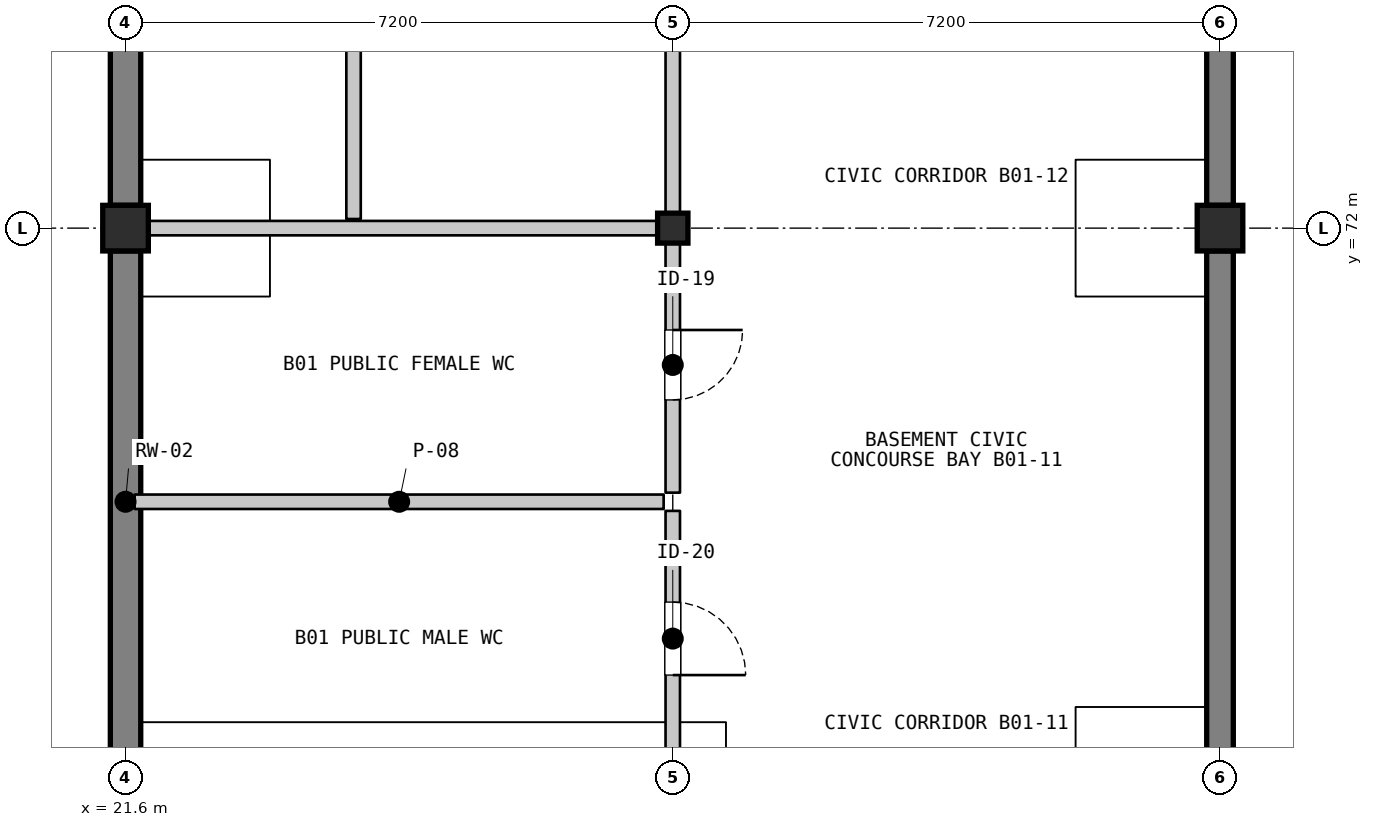
"""IFC4 building model, lengths in metres.
Left out: names, types, materials, properties, quantities, classifications, styles, units other than length and angle.
Written with IfcOpenShell. Run it as: python <this file> out.ifc"""

import sys

from ifc_helpers import new_model, si_unit, direction, frame, frame_2d, origin, origin_2d, place, context, subcontext, project, spatial, rectangle, i_section, extrude, element, fill, save


model = new_model("IFC4")
c1 = context("Model", 3, precision=1e-05, world=origin(), true_north=direction((0.0, 1.0)))
c2 = subcontext(c1, "Body", "Model", "MODEL_VIEW")
j1 = project(units=[si_unit("LENGTHUNIT", "METRE"), si_unit("PLANEANGLEUNIT", "RADIAN")], contexts=[c1])
p1 = place(None, origin())
s1 = spatial("IfcSite", under=j1, at=p1, CompositionType="ELEMENT")
p2 = place(p1, origin())
s2 = spatial("IfcBuilding", under=s1, at=p2, CompositionType="ELEMENT")
p3 = place(p2, frame((0.0, 0.0, -4.2)))
s3 = spatial("IfcBuildingStorey", under=s2, at=p3, CompositionType="ELEMENT", Elevation=-4.2)
for number, where, z_axis, x_axis in (
    (1, (21.6, 65.1, 0.0), (0.0, 0.0, 1.0), (0.0, 1.0, 0.0)),
    (2, (21.6, 72.3, 0.0), (0.0, 0.0, 1.0), (0.0, 1.0, 0.0)),
):
    element("IfcWall", number, at=place(p3, frame(where, z_axis=z_axis, x_axis=x_axis)), inside=s3, PredefinedType="USERDEFINED", context=c2, shape_type="SweptSolid", body=[
        extrude(rectangle(XDim=6.6, YDim=0.4, at=frame_2d((3.3, 0.0))), origin(), (0.0, 0.0, 1.0), 3.98),
    ])
for number, where, z_axis, x_axis in (
    (3, (36.0, 65.1, 0.0), (0.0, 0.0, 1.0), (0.0, 1.0, 0.0)),
    (4, (36.0, 72.3, 0.0), (0.0, 0.0, 1.0), (0.0, 1.0, 0.0)),
):
    element("IfcWall", number, at=place(p3, frame(where, z_axis=z_axis, x_axis=x_axis)), inside=s3, PredefinedType="USERDEFINED", context=c2, shape_type="SweptSolid", body=[
        extrude(rectangle(XDim=6.6, YDim=0.35, at=frame_2d((3.3, 0.0))), origin(), (0.0, 0.0, 1.0), 3.98),
    ])
p4 = place(p3, frame((21.6, 72.0, 0.0), z_axis=(0.0, 0.0, 1.0), x_axis=(1.0, 0.0, 0.0)))
e5 = element("IfcColumn", 5, at=p4, inside=s3, PredefinedType="COLUMN", context=c2, shape_type="SweptSolid", body=[
    extrude(rectangle(XDim=0.6, YDim=0.6, at=origin_2d()), origin(), (0.0, 0.0, 1.0), 4.2),
])
p5 = place(p3, frame((28.8, 72.0, 0.0), z_axis=(0.0, 0.0, 1.0), x_axis=(1.0, 0.0, 0.0)))
e6 = element("IfcColumn", 6, at=p5, inside=s3, PredefinedType="COLUMN", context=c2, shape_type="SweptSolid", body=[
    extrude(i_section(OverallWidth=0.399, OverallDepth=0.394, WebThickness=0.023, FlangeThickness=0.037, FilletRadius=0.015, at=origin_2d()), origin(), (0.0, 0.0, 1.0), 4.2),
])
p6 = place(p3, frame((36.0, 72.0, 0.0), z_axis=(0.0, 0.0, 1.0), x_axis=(1.0, 0.0, 0.0)))
e7 = element("IfcColumn", 7, at=p6, inside=s3, PredefinedType="COLUMN", context=c2, shape_type="SweptSolid", body=[
    extrude(rectangle(XDim=0.6, YDim=0.6, at=origin_2d()), origin(), (0.0, 0.0, 1.0), 4.2),
])
p7 = place(p3, frame((28.8, 68.28, 0.0), z_axis=(0.0, 0.0, 1.0), x_axis=(0.0, -1.0, 0.0)))
e8 = element("IfcWall", 8, at=p7, inside=s3, PredefinedType="PARTITIONING", context=c2, shape_type="SweptSolid", body=[
    extrude(rectangle(XDim=3.36, YDim=0.19, at=frame_2d((1.68, 0.0))), origin(), (0.0, 0.0, 1.0), 3.368),
])
p8 = place(p7, frame((1.2, 0.0, 0.0)))
e9 = element("IfcOpeningElement", 9, at=p8, cuts=e8, PredefinedType="OPENING", context=c2, shape_type="SweptSolid", body=[
    extrude(rectangle(XDim=0.96, YDim=2.1, at=frame_2d((0.48, 1.05))), frame((0.0, 0.105, 0.0), z_axis=(0.0, -1.0, 0.0), x_axis=(1.0, 0.0, 0.0)), (0.0, 0.0, 1.0), 0.21),
])
p9 = place(p3, frame((21.72, 68.4, 0.0), z_axis=(0.0, 0.0, 1.0), x_axis=(1.0, 0.0, 0.0)))
e10 = element("IfcWall", 10, at=p9, inside=s3, PredefinedType="PARTITIONING", context=c2, shape_type="SweptSolid", body=[
    extrude(rectangle(XDim=6.96, YDim=0.19, at=frame_2d((3.48, 0.0))), origin(), (0.0, 0.0, 1.0), 3.437),
])
p10 = place(p3, frame((28.8, 71.88, 0.0), z_axis=(0.0, 0.0, 1.0), x_axis=(0.0, -1.0, 0.0)))
e11 = element("IfcWall", 11, at=p10, inside=s3, PredefinedType="PARTITIONING", context=c2, shape_type="SweptSolid", body=[
    extrude(rectangle(XDim=3.36, YDim=0.19, at=frame_2d((1.68, 0.0))), origin(), (0.0, 0.0, 1.0), 3.368),
])
p11 = place(p10, frame((1.22, 0.0, 0.0)))
e12 = element("IfcOpeningElement", 12, at=p11, cuts=e11, PredefinedType="OPENING", context=c2, shape_type="SweptSolid", body=[
    extrude(rectangle(XDim=0.92, YDim=2.1, at=frame_2d((0.46, 1.05))), frame((0.0, 0.105, 0.0), z_axis=(0.0, -1.0, 0.0), x_axis=(1.0, 0.0, 0.0)), (0.0, 0.0, 1.0), 0.21),
])
for number, where, z_axis, x_axis in (
    (13, (21.72, 72.0, 0.0), (0.0, 0.0, 1.0), (1.0, 0.0, 0.0)),
    (14, (24.6, 79.08, 0.0), (0.0, 0.0, 1.0), (0.0, -1.0, 0.0)),
):
    element("IfcWall", number, at=place(p3, frame(where, z_axis=z_axis, x_axis=x_axis)), inside=s3, PredefinedType="PARTITIONING", context=c2, shape_type="SweptSolid", body=[
        extrude(rectangle(XDim=6.96, YDim=0.19, at=frame_2d((3.48, 0.0))), origin(), (0.0, 0.0, 1.0), 3.368),
    ])
p12 = place(p3, frame((28.8, 78.92, 0.0), z_axis=(0.0, 0.0, 1.0), x_axis=(0.0, -1.0, 0.0)))
e15 = element("IfcWall", 15, at=p12, inside=s3, PredefinedType="PARTITIONING", context=c2, shape_type="SweptSolid", body=[
    extrude(rectangle(XDim=6.8, YDim=0.19, at=frame_2d((3.4, 0.0))), origin(), (0.0, 0.0, 1.0), 3.368),
])
p13 = place(p8, origin())
e16 = element("IfcDoor", 16, at=p13, inside=s3, OperationType="SINGLE_SWING_RIGHT", PredefinedType="DOOR", context=c2, shape_type="SweptSolid", body=[
    extrude(rectangle(XDim=0.96, YDim=2.1, at=frame_2d((0.48, 1.05))), frame((0.0, 0.025, 0.0), z_axis=(0.0, -1.0, 0.0), x_axis=(1.0, 0.0, 0.0)), (0.0, 0.0, 1.0), 0.05),
])
fill(e9, e16)
p14 = place(p11, origin())
e17 = element("IfcDoor", 17, at=p14, inside=s3, OperationType="SINGLE_SWING_LEFT", PredefinedType="DOOR", context=c2, shape_type="SweptSolid", body=[
    extrude(rectangle(XDim=0.92, YDim=2.1, at=frame_2d((0.46, 1.05))), frame((0.0, 0.025, 0.0), z_axis=(0.0, -1.0, 0.0), x_axis=(1.0, 0.0, 0.0)), (0.0, 0.0, 1.0), 0.05),
])
fill(e12, e17)
save(model, sys.argv[1])
